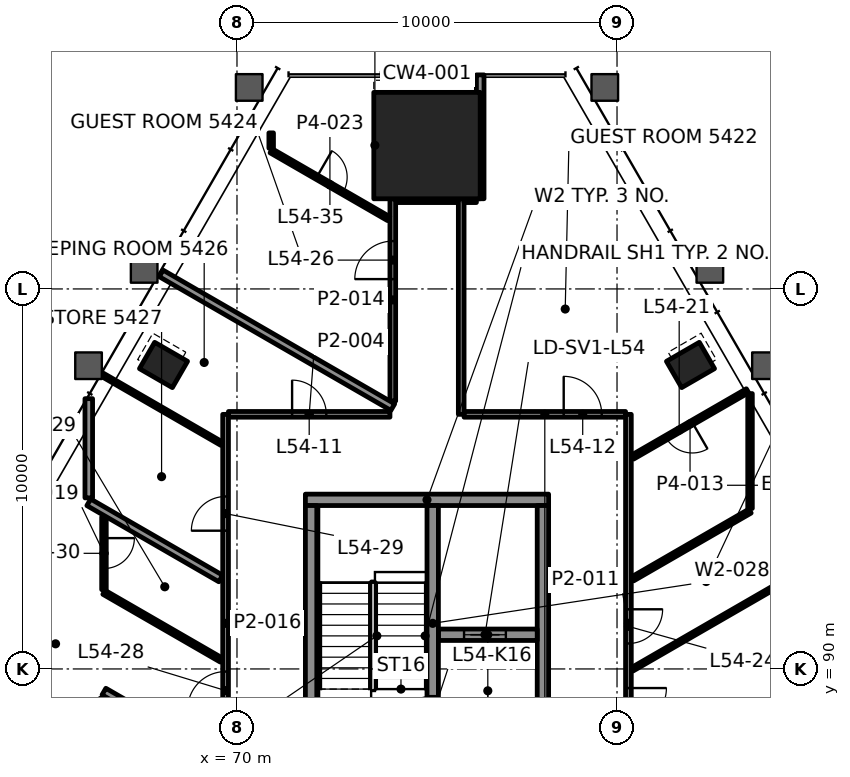
"""IFC4 building model, lengths in metres.
Left out: names, types, materials, properties, quantities, classifications, styles, units other than length and angle.
Written with IfcOpenShell. Run it as: python <this file> out.ifc"""

import sys

from ifc_helpers import new_model, si_unit, direction, frame, frame_2d, origin, origin_2d, place, context, subcontext, project, spatial, rectangle, hollow_rectangle, extrude, element, fill, save


model = new_model("IFC4")
c1 = context("Model", 3, precision=1e-05, world=origin(), true_north=direction((0.0, 1.0)))
c2 = subcontext(c1, "Body", "Model", "MODEL_VIEW")
j1 = project(units=[si_unit("LENGTHUNIT", "METRE"), si_unit("PLANEANGLEUNIT", "RADIAN")], contexts=[c1])
p1 = place(None, origin())
s1 = spatial("IfcSite", under=j1, at=p1, CompositionType="ELEMENT")
p2 = place(p1, origin())
s2 = spatial("IfcBuilding", under=s1, at=p2, CompositionType="ELEMENT")
p3 = place(p2, frame((0.0, 0.0, 229.9)))
s3 = spatial("IfcBuildingStorey", under=s2, at=p3, CompositionType="ELEMENT", Elevation=229.9)
p4 = place(p3, frame((75.0, 103.773, 0.0), z_axis=(0.0, 0.0, 1.0), x_axis=(-1.0, 0.0, 0.0)))
e1 = element("IfcColumn", 1, at=p4, inside=s3, PredefinedType="COLUMN", context=c2, shape_type="SweptSolid", body=[
    extrude(rectangle(XDim=2.8, YDim=2.8, at=origin_2d()), origin(), (0.0, 0.0, 1.0), 3.9),
])
for number, where, z_axis, x_axis in (
    (2, (81.933, 97.999, -0.0), (0.0, 0.0, 1.0), (-0.5, 0.866, 0.0)),
    (3, (68.067, 97.999, -0.0), (0.0, 0.0, 1.0), (-0.5, -0.866, 0.0)),
):
    element("IfcColumn", number, at=place(p3, frame(where, z_axis=z_axis, x_axis=x_axis)), inside=s3, PredefinedType="COLUMN", context=c2, shape_type="SweptSolid", body=[
        extrude(hollow_rectangle(XDim=0.8, YDim=1.0, WallThickness=0.05, at=origin_2d()), origin(), (0.0, 0.0, 1.0), 3.9),
    ])
p5 = place(p3, frame((71.8, 94.45, 0.0), z_axis=(0.0, 0.0, 1.0), x_axis=(1.0, 0.0, 0.0)))
e4 = element("IfcWall", 4, at=p5, inside=s3, PredefinedType="SHEAR", context=c2, shape_type="SweptSolid", body=[
    extrude(rectangle(XDim=6.4, YDim=0.3, at=frame_2d((3.2, 0.0))), origin(), (0.0, 0.0, 1.0), 3.7),
])
for number, where, z_axis, x_axis in (
    (5, (71.95, 88.1, 0.0), (0.0, 0.0, 1.0), (0.0, 1.0, 0.0)),
    (6, (78.05, 88.1, 0.0), (0.0, 0.0, 1.0), (0.0, 1.0, 0.0)),
):
    element("IfcWall", number, at=place(p3, frame(where, z_axis=z_axis, x_axis=x_axis)), inside=s3, PredefinedType="SHEAR", context=c2, shape_type="SweptSolid", body=[
        extrude(rectangle(XDim=6.2, YDim=0.3, at=frame_2d((3.1, 0.0))), origin(), (0.0, 0.0, 1.0), 3.7),
    ])
p6 = place(p3, frame((75.3, 90.9, 0.0), z_axis=(0.0, 0.0, 1.0), x_axis=(1.0, 0.0, 0.0)))
e7 = element("IfcWall", 7, at=p6, inside=s3, PredefinedType="SHEAR", context=c2, shape_type="SweptSolid", body=[
    extrude(rectangle(XDim=2.6, YDim=0.3, at=frame_2d((1.3, 0.0))), origin(), (0.0, 0.0, 1.0), 3.7),
])
p7 = place(p6, frame((0.675, 0.0, 0.0)))
e8 = element("IfcOpeningElement", 8, at=p7, cuts=e7, PredefinedType="OPENING", context=c2, shape_type="SweptSolid", body=[
    extrude(rectangle(XDim=1.1, YDim=2.1, at=frame_2d((0.55, 1.05))), frame((0.0, 0.16, 0.0), z_axis=(0.0, -1.0, 0.0), x_axis=(1.0, 0.0, 0.0)), (0.0, 0.0, 1.0), 0.32),
])
p8 = place(p3, frame((75.15, 88.1, 0.0), z_axis=(0.0, 0.0, 1.0), x_axis=(0.0, 1.0, 0.0)))
e9 = element("IfcWall", 9, at=p8, inside=s3, PredefinedType="SHEAR", context=c2, shape_type="SweptSolid", body=[
    extrude(rectangle(XDim=6.2, YDim=0.3, at=frame_2d((3.1, 0.0))), origin(), (0.0, 0.0, 1.0), 3.7),
])
p9 = place(p8, frame((0.185, 0.0, 0.0)))
e10 = element("IfcOpeningElement", 10, at=p9, cuts=e9, PredefinedType="OPENING", context=c2, shape_type="SweptSolid", body=[
    extrude(rectangle(XDim=1.0, YDim=2.1, at=frame_2d((0.5, 1.05))), frame((0.0, 0.16, 0.0), z_axis=(0.0, -1.0, 0.0), x_axis=(1.0, 0.0, 0.0)), (0.0, 0.0, 1.0), 0.32),
])
p10 = place(p3, frame((69.775, 96.7, 0.0), z_axis=(0.0, 0.0, 1.0), x_axis=(1.0, 0.0, 0.0)))
e11 = element("IfcWall", 11, at=p10, inside=s3, PredefinedType="PARTITIONING", context=c2, shape_type="SweptSolid", body=[
    extrude(rectangle(XDim=4.25, YDim=0.15, at=frame_2d((2.125, 0.0))), origin(), (0.0, 0.0, 1.0), 3.1),
])
p11 = place(p10, frame((1.675, 0.0, 0.0)))
e12 = element("IfcOpeningElement", 12, at=p11, cuts=e11, PredefinedType="OPENING", context=c2, shape_type="SweptSolid", body=[
    extrude(rectangle(XDim=0.9, YDim=2.1, at=frame_2d((0.45, 1.05))), frame((0.0, 0.085, 0.0), z_axis=(0.0, -1.0, 0.0), x_axis=(1.0, 0.0, 0.0)), (0.0, 0.0, 1.0), 0.17),
])
p12 = place(p3, frame((75.975, 96.7, 0.0), z_axis=(0.0, 0.0, 1.0), x_axis=(1.0, 0.0, 0.0)))
e13 = element("IfcWall", 13, at=p12, inside=s3, PredefinedType="PARTITIONING", context=c2, shape_type="SweptSolid", body=[
    extrude(rectangle(XDim=4.25, YDim=0.15, at=frame_2d((2.125, 0.0))), origin(), (0.0, 0.0, 1.0), 3.1),
])
p13 = place(p12, frame((2.622, 0.0, 0.0)))
e14 = element("IfcOpeningElement", 14, at=p13, cuts=e13, PredefinedType="OPENING", context=c2, shape_type="SweptSolid", body=[
    extrude(rectangle(XDim=1.0, YDim=2.1, at=frame_2d((0.5, 1.05))), frame((0.0, 0.085, 0.0), z_axis=(0.0, -1.0, 0.0), x_axis=(1.0, 0.0, 0.0)), (0.0, 0.0, 1.0), 0.17),
])
p14 = place(p3, frame((74.176, 102.373, 0.0), z_axis=(0.0, 0.0, 1.0), x_axis=(1.0, 0.0, 0.0)))
e15 = element("IfcWall", 15, at=p14, inside=s3, PredefinedType="PARTITIONING", context=c2, shape_type="SweptSolid", body=[
    extrude(rectangle(XDim=1.649, YDim=0.2, at=frame_2d((0.825, 0.0))), origin(), (0.0, 0.0, 1.0), 3.097),
])
p15 = place(p3, frame((80.401, 89.991, 0.0), z_axis=(0.0, 0.0, 1.0), x_axis=(0.866025831117, 0.499999259837, 0.0)))
e16 = element("IfcWall", 16, at=p15, inside=s3, PredefinedType="PARTITIONING", context=c2, shape_type="SweptSolid", body=[
    extrude(rectangle(XDim=6.591, YDim=0.1, at=frame_2d((3.296, 0.0))), origin(), (0.0, 0.0, 1.0), 3.022),
])
p16 = place(p3, frame((80.41, 92.37, 0.0), z_axis=(0.0, 0.0, 1.0), x_axis=(0.866028357664, 0.499994883695, 0.0)))
e17 = element("IfcWall", 17, at=p16, inside=s3, PredefinedType="PARTITIONING", context=c2, shape_type="SweptSolid", body=[
    extrude(rectangle(XDim=3.568, YDim=0.12, at=frame_2d((1.784, 0.0))), origin(), (0.0, 0.0, 1.0), 3.1),
])
p17 = place(p3, frame((83.433, 97.321, 0.0), z_axis=(0.0, 0.0, 1.0), x_axis=(-0.866022549299, -0.50000494408, 0.0)))
e18 = element("IfcWall", 18, at=p17, inside=s3, PredefinedType="PARTITIONING", context=c2, shape_type="SweptSolid", body=[
    extrude(rectangle(XDim=3.491, YDim=0.12, at=frame_2d((1.746, 0.0))), origin(), (0.0, 0.0, 1.0), 3.022),
])
p18 = place(p17, frame((1.676, 0.0, 0.0)))
e19 = element("IfcOpeningElement", 19, at=p18, cuts=e18, PredefinedType="OPENING", context=c2, shape_type="SweptSolid", body=[
    extrude(rectangle(XDim=0.8, YDim=2.1, at=frame_2d((0.4, 1.05))), frame((0.0, 0.07, 0.0), z_axis=(0.0, -1.0, 0.0), x_axis=(1.0, 0.0, 0.0)), (0.0, 0.0, 1.0), 0.14),
])
p19 = place(p3, frame((83.5, 94.224, 0.0), z_axis=(0.0, 0.0, 1.0), x_axis=(0.0, 1.0, 0.0)))
e20 = element("IfcWall", 20, at=p19, inside=s3, PredefinedType="PARTITIONING", context=c2, shape_type="SweptSolid", body=[
    extrude(rectangle(XDim=3.022, YDim=0.12, at=frame_2d((1.511, 0.0))), origin(), (0.0, 0.0, 1.0), 3.022),
])
p20 = place(p3, frame((80.3, 96.699, 0.0), z_axis=(0.0, 0.0, 1.0), x_axis=(0.0, -1.0, 0.0)))
e21 = element("IfcWall", 21, at=p20, inside=s3, PredefinedType="PARTITIONING", context=c2, shape_type="SweptSolid", body=[
    extrude(rectangle(XDim=10.999, YDim=0.15, at=frame_2d((5.5, 0.0))), origin(), (0.0, 0.0, 1.0), 3.1),
])
p21 = place(p20, frame((5.129, 0.0, 0.0)))
e22 = element("IfcOpeningElement", 22, at=p21, cuts=e21, PredefinedType="OPENING", context=c2, shape_type="SweptSolid", body=[
    extrude(rectangle(XDim=0.9, YDim=2.1, at=frame_2d((0.45, 1.05))), frame((0.0, 0.085, 0.0), z_axis=(0.0, -1.0, 0.0), x_axis=(1.0, 0.0, 0.0)), (0.0, 0.0, 1.0), 0.17),
])
p22 = place(p20, frame((7.202, 0.0, 0.0)))
e23 = element("IfcOpeningElement", 23, at=p22, cuts=e21, PredefinedType="OPENING", context=c2, shape_type="SweptSolid", body=[
    extrude(rectangle(XDim=1.0, YDim=2.1, at=frame_2d((0.5, 1.05))), frame((0.0, 0.085, 0.0), z_axis=(0.0, -1.0, 0.0), x_axis=(1.0, 0.0, 0.0)), (0.0, 0.0, 1.0), 0.17),
])
p23 = place(p3, frame((76.4, 102.373, 0.0), z_axis=(0.0, 0.0, 1.0), x_axis=(0.0, 1.0, 0.0)))
e24 = element("IfcWall", 24, at=p23, inside=s3, PredefinedType="PARTITIONING", context=c2, shape_type="SweptSolid", body=[
    extrude(rectangle(XDim=3.26, YDim=0.2, at=frame_2d((1.63, 0.0))), origin(), (0.0, 0.0, 1.0), 3.1),
])
p24 = place(p3, frame((75.9, 96.7, 0.0), z_axis=(0.0, 0.0, 1.0), x_axis=(0.0, 1.0, 0.0)))
e25 = element("IfcWall", 25, at=p24, inside=s3, PredefinedType="PARTITIONING", context=c2, shape_type="SweptSolid", body=[
    extrude(rectangle(XDim=5.673, YDim=0.15, at=frame_2d((2.836, 0.0))), origin(), (0.0, 0.0, 1.0), 3.1),
])
p25 = place(p3, frame((74.1, 97.05, 0.0), z_axis=(0.0, 0.0, 1.0), x_axis=(0.0, 1.0, 0.0)))
e26 = element("IfcWall", 26, at=p25, inside=s3, PredefinedType="PARTITIONING", context=c2, shape_type="SweptSolid", body=[
    extrude(rectangle(XDim=5.322, YDim=0.15, at=frame_2d((2.661, 0.0))), origin(), (0.0, 0.0, 1.0), 3.1),
])
p26 = place(p25, frame((3.209, 0.0, 0.0)))
e27 = element("IfcOpeningElement", 27, at=p26, cuts=e26, PredefinedType="OPENING", context=c2, shape_type="SweptSolid", body=[
    extrude(rectangle(XDim=1.0, YDim=2.1, at=frame_2d((0.5, 1.05))), frame((0.0, 0.085, 0.0), z_axis=(0.0, -1.0, 0.0), x_axis=(1.0, 0.0, 0.0)), (0.0, 0.0, 1.0), 0.17),
])
p27 = place(p3, frame((70.9, 103.703, 0.0), z_axis=(0.0, 0.0, 1.0), x_axis=(0.0, 1.0, 0.0)))
e28 = element("IfcWall", 28, at=p27, inside=s3, PredefinedType="PARTITIONING", context=c2, shape_type="SweptSolid", body=[
    extrude(rectangle(XDim=0.403, YDim=0.12, at=frame_2d((0.202, 0.0))), origin(), (0.0, 0.0, 1.0), 3.1),
])
p28 = place(p3, frame((69.7, 85.7, 0.0), z_axis=(0.0, 0.0, 1.0), x_axis=(0.0, 1.0, 0.0)))
e29 = element("IfcWall", 29, at=p28, inside=s3, PredefinedType="PARTITIONING", context=c2, shape_type="SweptSolid", body=[
    extrude(rectangle(XDim=10.999, YDim=0.15, at=frame_2d((5.5, 0.0))), origin(), (0.0, 0.0, 1.0), 3.1),
])
p29 = place(p28, frame((3.23, 0.0, 0.0)))
e30 = element("IfcOpeningElement", 30, at=p29, cuts=e29, PredefinedType="OPENING", context=c2, shape_type="SweptSolid", body=[
    extrude(rectangle(XDim=1.0, YDim=2.1, at=frame_2d((0.5, 1.05))), frame((0.0, 0.085, 0.0), z_axis=(0.0, -1.0, 0.0), x_axis=(1.0, 0.0, 0.0)), (0.0, 0.0, 1.0), 0.17),
])
p30 = place(p28, frame((7.938, 0.0, 0.0)))
e31 = element("IfcOpeningElement", 31, at=p30, cuts=e29, PredefinedType="OPENING", context=c2, shape_type="SweptSolid", body=[
    extrude(rectangle(XDim=0.9, YDim=2.1, at=frame_2d((0.45, 1.05))), frame((0.0, 0.085, 0.0), z_axis=(0.0, -1.0, 0.0), x_axis=(1.0, 0.0, 0.0)), (0.0, 0.0, 1.0), 0.17),
])
p31 = place(p3, frame((66.5, 93.999, 0.0), z_axis=(0.0, 0.0, 1.0), x_axis=(0.0, -1.0, 0.0)))
e32 = element("IfcWall", 32, at=p31, inside=s3, PredefinedType="PARTITIONING", context=c2, shape_type="SweptSolid", body=[
    extrude(rectangle(XDim=1.912, YDim=0.12, at=frame_2d((0.956, 0.0))), origin(), (0.0, 0.0, 1.0), 3.1),
])
p32 = place(p31, frame((0.556, 0.0, 0.0)))
e33 = element("IfcOpeningElement", 33, at=p32, cuts=e32, PredefinedType="OPENING", context=c2, shape_type="SweptSolid", body=[
    extrude(rectangle(XDim=0.8, YDim=2.1, at=frame_2d((0.4, 1.05))), frame((0.0, 0.07, 0.0), z_axis=(0.0, -1.0, 0.0), x_axis=(1.0, 0.0, 0.0)), (0.0, 0.0, 1.0), 0.14),
])
p33 = place(p3, frame((66.1, 94.502, 0.0), z_axis=(0.0, 0.0, 1.0), x_axis=(0.0, 1.0, 0.0)))
e34 = element("IfcWall", 34, at=p33, inside=s3, PredefinedType="PARTITIONING", context=c2, shape_type="SweptSolid", body=[
    extrude(rectangle(XDim=2.611, YDim=0.2, at=frame_2d((1.306, 0.0))), origin(), (0.0, 0.0, 1.0), 3.022),
])
p34 = place(p3, frame((70.9, 103.634, 0.0), z_axis=(0.0, 0.0, 1.0), x_axis=(0.866028357664, -0.499994883695, 0.0)))
e35 = element("IfcWall", 35, at=p34, inside=s3, PredefinedType="PARTITIONING", context=c2, shape_type="SweptSolid", body=[
    extrude(rectangle(XDim=3.568, YDim=0.12, at=frame_2d((1.784, 0.0))), origin(), (0.0, 0.0, 1.0), 3.1),
])
p35 = place(p34, frame((1.384, 0.0, 0.0)))
e36 = element("IfcOpeningElement", 36, at=p35, cuts=e35, PredefinedType="OPENING", context=c2, shape_type="SweptSolid", body=[
    extrude(rectangle(XDim=0.8, YDim=2.1, at=frame_2d((0.4, 1.05))), frame((0.0, 0.07, 0.0), z_axis=(0.0, -1.0, 0.0), x_axis=(1.0, 0.0, 0.0)), (0.0, 0.0, 1.0), 0.14),
])
p36 = place(p3, frame((74.1, 96.89, 0.0), z_axis=(0.0, 0.0, 1.0), x_axis=(-0.8660256076, 0.499999646981, 0.0)))
e37 = element("IfcWall", 37, at=p36, inside=s3, PredefinedType="PARTITIONING", context=c2, shape_type="SweptSolid", body=[
    extrude(rectangle(XDim=7.04, YDim=0.2, at=frame_2d((3.52, 0.0))), origin(), (0.0, 0.0, 1.0), 3.1),
])
p37 = place(p3, frame((69.599, 95.927, 0.0), z_axis=(0.0, 0.0, 1.0), x_axis=(-0.866028486751, 0.499994660107, 0.0)))
e38 = element("IfcWall", 38, at=p37, inside=s3, PredefinedType="PARTITIONING", context=c2, shape_type="SweptSolid", body=[
    extrude(rectangle(XDim=3.623, YDim=0.1, at=frame_2d((1.812, 0.0))), origin(), (0.0, 0.0, 1.0), 3.022),
])
p38 = place(p3, frame((69.573, 92.38, 0.0), z_axis=(0.0, 0.0, 1.0), x_axis=(-0.866020331166, 0.500008785931, 0.0)))
e39 = element("IfcWall", 39, at=p38, inside=s3, PredefinedType="PARTITIONING", context=c2, shape_type="SweptSolid", body=[
    extrude(rectangle(XDim=4.01, YDim=0.2, at=frame_2d((2.005, 0.0))), origin(), (0.0, 0.0, 1.0), 3.022),
])
p39 = place(p3, frame((69.59, 90.233, 0.0), z_axis=(0.0, 0.0, 1.0), x_axis=(-0.866028357664, 0.499994883695, 0.0)))
e40 = element("IfcWall", 40, at=p39, inside=s3, PredefinedType="PARTITIONING", context=c2, shape_type="SweptSolid", body=[
    extrude(rectangle(XDim=3.568, YDim=0.12, at=frame_2d((1.784, 0.0))), origin(), (0.0, 0.0, 1.0), 3.1),
])
p40 = place(p3, frame((69.573, 87.631, 0.0), z_axis=(0.0, 0.0, 1.0), x_axis=(-0.866028616566, 0.499994435258, 0.0)))
e41 = element("IfcWall", 41, at=p40, inside=s3, PredefinedType="PARTITIONING", context=c2, shape_type="SweptSolid", body=[
    extrude(rectangle(XDim=3.548, YDim=0.2, at=frame_2d((1.774, 0.0))), origin(), (0.0, 0.0, 1.0), 3.1),
])
p41 = place(p3, frame((75.975, 102.373, 0.0), z_axis=(0.0, 0.0, 1.0), x_axis=(1.0, 0.0, 0.0)))
e42 = element("IfcWall", 42, at=p41, inside=s3, PredefinedType="PARTITIONING", context=c2, shape_type="SweptSolid", body=[
    extrude(rectangle(XDim=0.324, YDim=0.2, at=frame_2d((0.162, 0.0))), origin(), (0.0, 0.0, 1.0), 3.1),
])
p42 = place(p11, origin())
e43 = element("IfcDoor", 43, at=p42, inside=s3, OperationType="SINGLE_SWING_LEFT", PredefinedType="DOOR", context=c2, shape_type="SweptSolid", body=[
    extrude(rectangle(XDim=0.9, YDim=2.1, at=frame_2d((0.45, 1.05))), frame((0.0, 0.025, 0.0), z_axis=(0.0, -1.0, 0.0), x_axis=(1.0, 0.0, 0.0)), (0.0, 0.0, 1.0), 0.05),
])
fill(e12, e43)
p43 = place(p13, origin())
e44 = element("IfcDoor", 44, at=p43, inside=s3, OperationType="SINGLE_SWING_LEFT", PredefinedType="DOOR", context=c2, shape_type="SweptSolid", body=[
    extrude(rectangle(XDim=1.0, YDim=2.1, at=frame_2d((0.5, 1.05))), frame((0.0, 0.025, 0.0), z_axis=(0.0, -1.0, 0.0), x_axis=(1.0, 0.0, 0.0)), (0.0, 0.0, 1.0), 0.05),
])
fill(e14, e44)
p44 = place(p18, origin())
e45 = element("IfcDoor", 45, at=p44, inside=s3, OperationType="SINGLE_SWING_LEFT", PredefinedType="DOOR", context=c2, shape_type="SweptSolid", body=[
    extrude(rectangle(XDim=0.8, YDim=2.1, at=frame_2d((0.4, 1.05))), frame((0.0, 0.025, 0.0), z_axis=(0.0, -1.0, 0.0), x_axis=(1.0, 0.0, 0.0)), (0.0, 0.0, 1.0), 0.05),
])
fill(e19, e45)
p45 = place(p21, origin())
e46 = element("IfcDoor", 46, at=p45, inside=s3, OperationType="SINGLE_SWING_LEFT", PredefinedType="DOOR", context=c2, shape_type="SweptSolid", body=[
    extrude(rectangle(XDim=0.9, YDim=2.1, at=frame_2d((0.45, 1.05))), frame((0.0, 0.025, 0.0), z_axis=(0.0, -1.0, 0.0), x_axis=(1.0, 0.0, 0.0)), (0.0, 0.0, 1.0), 0.05),
])
fill(e22, e46)
p46 = place(p22, origin())
e47 = element("IfcDoor", 47, at=p46, inside=s3, OperationType="SINGLE_SWING_LEFT", PredefinedType="DOOR", context=c2, shape_type="SweptSolid", body=[
    extrude(rectangle(XDim=1.0, YDim=2.1, at=frame_2d((0.5, 1.05))), frame((0.0, 0.025, 0.0), z_axis=(0.0, -1.0, 0.0), x_axis=(1.0, 0.0, 0.0)), (0.0, 0.0, 1.0), 0.05),
])
fill(e23, e47)
p47 = place(p26, origin())
e48 = element("IfcDoor", 48, at=p47, inside=s3, OperationType="SINGLE_SWING_LEFT", PredefinedType="DOOR", context=c2, shape_type="SweptSolid", body=[
    extrude(rectangle(XDim=1.0, YDim=2.1, at=frame_2d((0.5, 1.05))), frame((0.0, 0.025, 0.0), z_axis=(0.0, -1.0, 0.0), x_axis=(1.0, 0.0, 0.0)), (0.0, 0.0, 1.0), 0.05),
])
fill(e27, e48)
p48 = place(p29, origin())
e49 = element("IfcDoor", 49, at=p48, inside=s3, OperationType="SINGLE_SWING_LEFT", PredefinedType="DOOR", context=c2, shape_type="SweptSolid", body=[
    extrude(rectangle(XDim=1.0, YDim=2.1, at=frame_2d((0.5, 1.05))), frame((0.0, 0.025, 0.0), z_axis=(0.0, -1.0, 0.0), x_axis=(1.0, 0.0, 0.0)), (0.0, 0.0, 1.0), 0.05),
])
fill(e30, e49)
p49 = place(p30, origin())
e50 = element("IfcDoor", 50, at=p49, inside=s3, OperationType="SINGLE_SWING_RIGHT", PredefinedType="DOOR", context=c2, shape_type="SweptSolid", body=[
    extrude(rectangle(XDim=0.9, YDim=2.1, at=frame_2d((0.45, 1.05))), frame((0.0, 0.025, 0.0), z_axis=(0.0, -1.0, 0.0), x_axis=(1.0, 0.0, 0.0)), (0.0, 0.0, 1.0), 0.05),
])
fill(e31, e50)
p50 = place(p32, origin())
e51 = element("IfcDoor", 51, at=p50, inside=s3, OperationType="SINGLE_SWING_LEFT", PredefinedType="DOOR", context=c2, shape_type="SweptSolid", body=[
    extrude(rectangle(XDim=0.8, YDim=2.1, at=frame_2d((0.4, 1.05))), frame((0.0, 0.025, 0.0), z_axis=(0.0, -1.0, 0.0), x_axis=(1.0, 0.0, 0.0)), (0.0, 0.0, 1.0), 0.05),
])
fill(e33, e51)
p51 = place(p35, origin())
e52 = element("IfcDoor", 52, at=p51, inside=s3, OperationType="SINGLE_SWING_LEFT", PredefinedType="DOOR", context=c2, shape_type="SweptSolid", body=[
    extrude(rectangle(XDim=0.8, YDim=2.1, at=frame_2d((0.4, 1.05))), frame((0.0, 0.025, 0.0), z_axis=(0.0, -1.0, 0.0), x_axis=(1.0, 0.0, 0.0)), (0.0, 0.0, 1.0), 0.05),
])
fill(e36, e52)
p52 = place(p3, origin())
p53 = place(p52, frame((69.677, 103.399, 0.15), z_axis=(0.0, 0.0, 1.0), x_axis=(-0.5, -0.866025, 0.0)))
p54 = place(p53, origin())
e53 = element("IfcWindow", 53, at=p54, inside=s3, PartitioningType="SINGLE_PANEL", PredefinedType="WINDOW", context=c2, shape_type="SweptSolid", body=[
    extrude(rectangle(XDim=2.667, YDim=3.55, at=frame_2d((1.333, 1.775))), frame((0.0, 0.03, 0.0), z_axis=(0.0, -1.0, 0.0), x_axis=(1.0, 0.0, 0.0)), (0.0, 0.0, 1.0), 0.06),
])
p55 = place(p7, origin())
e54 = element("IfcDoor", 54, at=p55, inside=s3, OperationType="DOUBLE_DOOR_SLIDING", PredefinedType="DOOR", context=c2, shape_type="SweptSolid", body=[
    extrude(rectangle(XDim=1.1, YDim=2.1, at=frame_2d((0.55, 1.05))), frame((0.0, 0.025, 0.0), z_axis=(0.0, -1.0, 0.0), x_axis=(1.0, 0.0, 0.0)), (0.0, 0.0, 1.0), 0.05),
])
fill(e8, e54)
p56 = place(p9, origin())
e55 = element("IfcDoor", 55, at=p56, inside=s3, OperationType="SINGLE_SWING_LEFT", PredefinedType="DOOR", context=c2, shape_type="SweptSolid", body=[
    extrude(rectangle(XDim=1.0, YDim=2.1, at=frame_2d((0.5, 1.05))), frame((0.0, 0.025, 0.0), z_axis=(0.0, -1.0, 0.0), x_axis=(1.0, 0.0, 0.0)), (0.0, 0.0, 1.0), 0.05),
])
fill(e10, e55)
save(model, sys.argv[1])
